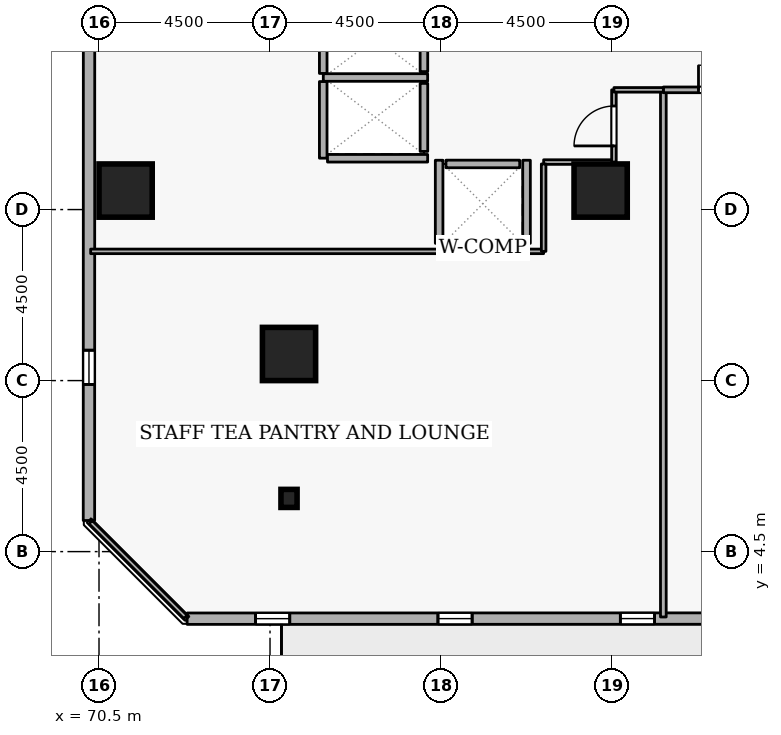
"""IFC4 building model, lengths in metres.
Left out: names, types, materials, properties, quantities, classifications, styles, units other than length and angle.
Written with IfcOpenShell. Run it as: python <this file> out.ifc"""

import sys

from ifc_helpers import new_model, si_unit, direction, frame, frame_2d, origin, origin_2d, place, context, subcontext, project, spatial, rectangle, i_section, extrude, element, fill, save


model = new_model("IFC4")
c1 = context("Model", 3, precision=1e-05, world=origin(), true_north=direction((0.0, 1.0)))
c2 = subcontext(c1, "Body", "Model", "MODEL_VIEW")
j1 = project(units=[si_unit("LENGTHUNIT", "METRE"), si_unit("PLANEANGLEUNIT", "RADIAN")], contexts=[c1])
p1 = place(None, origin())
s1 = spatial("IfcSite", under=j1, at=p1, CompositionType="ELEMENT")
p2 = place(p1, origin())
s2 = spatial("IfcBuilding", under=s1, at=p2, CompositionType="ELEMENT")
p3 = place(p2, frame((0.0, 0.0, 42.3)))
s3 = spatial("IfcBuildingStorey", under=s2, at=p3, CompositionType="ELEMENT", Elevation=42.3)
for number, where, z_axis, x_axis in (
    (1, (71.2, 14.0, 0.0), (0.0, 0.0, 1.0), (1.0, 0.0, 0.0)),
    (2, (75.5, 9.7, 0.0), (0.0, 0.0, 1.0), (1.0, 0.0, 0.0)),
    (3, (83.7, 14.0, 0.0), (0.0, 0.0, 1.0), (1.0, 0.0, 0.0)),
):
    element("IfcColumn", number, at=place(p3, frame(where, z_axis=z_axis, x_axis=x_axis)), inside=s3, PredefinedType="COLUMN", context=c2, shape_type="SweptSolid", body=[
        extrude(rectangle(XDim=1.4, YDim=1.4, at=origin_2d()), origin(), (0.0, 0.0, 1.0), 3.6),
    ])
p4 = place(p3, frame((75.5, 5.9, 0.0), z_axis=(0.0, 0.0, 1.0), x_axis=(1.0, 0.0, 0.0)))
e4 = element("IfcColumn", 4, at=p4, inside=s3, PredefinedType="COLUMN", context=c2, shape_type="SweptSolid", body=[
    extrude(i_section(OverallWidth=0.424, OverallDepth=0.475, WebThickness=0.048, FlangeThickness=0.077, FilletRadius=0.015, at=origin_2d()), origin(), (0.0, 0.0, 1.0), 3.6),
])
p5 = place(p3, frame((72.819, 2.735, 0.0), z_axis=(0.0, 0.0, 1.0), x_axis=(0.999999978205, 0.000208784245, 0.0)))
e5 = element("IfcWall", 5, at=p5, inside=s3, PredefinedType="STANDARD", context=c2, shape_type="SweptSolid", body=[
    extrude(rectangle(XDim=35.08, YDim=0.3, at=frame_2d((17.54, 0.0))), origin(), (0.0, 0.0, 1.0), 2.7),
])
p6 = place(p5, frame((19.34, 0.0, 0.0)))
e6 = element("IfcOpeningElement", 6, at=p6, cuts=e5, PredefinedType="OPENING", context=c2, shape_type="SweptSolid", body=[
    extrude(rectangle(XDim=1.0, YDim=2.08, at=frame_2d((0.5, 1.04))), frame((0.0, 0.16, 0.0), z_axis=(0.0, -1.0, 0.0), x_axis=(1.0, 0.0, 0.0)), (0.0, 0.0, 1.0), 0.32),
])
p7 = place(p5, frame((1.8, 0.0, 0.72)))
e7 = element("IfcOpeningElement", 7, at=p7, cuts=e5, PredefinedType="OPENING", context=c2, shape_type="SweptSolid", body=[
    extrude(rectangle(XDim=0.9, YDim=1.75, at=frame_2d((0.45, 0.875))), frame((0.0, 0.16, 0.0), z_axis=(0.0, -1.0, 0.0), x_axis=(1.0, 0.0, 0.0)), (0.0, 0.0, 1.0), 0.32),
])
p8 = place(p5, frame((6.6, 0.0, 0.72)))
e8 = element("IfcOpeningElement", 8, at=p8, cuts=e5, PredefinedType="OPENING", context=c2, shape_type="SweptSolid", body=[
    extrude(rectangle(XDim=0.9, YDim=1.75, at=frame_2d((0.45, 0.875))), frame((0.0, 0.16, 0.0), z_axis=(0.0, -1.0, 0.0), x_axis=(1.0, 0.0, 0.0)), (0.0, 0.0, 1.0), 0.32),
])
p9 = place(p5, frame((11.4, 0.0, 0.72)))
e9 = element("IfcOpeningElement", 9, at=p9, cuts=e5, PredefinedType="OPENING", context=c2, shape_type="SweptSolid", body=[
    extrude(rectangle(XDim=0.9, YDim=1.75, at=frame_2d((0.45, 0.875))), frame((0.0, 0.16, 0.0), z_axis=(0.0, -1.0, 0.0), x_axis=(1.0, 0.0, 0.0)), (0.0, 0.0, 1.0), 0.32),
])
p10 = place(p5, frame((16.2, 0.0, 0.72)))
e10 = element("IfcOpeningElement", 10, at=p10, cuts=e5, PredefinedType="OPENING", context=c2, shape_type="SweptSolid", body=[
    extrude(rectangle(XDim=0.9, YDim=1.75, at=frame_2d((0.45, 0.875))), frame((0.0, 0.16, 0.0), z_axis=(0.0, -1.0, 0.0), x_axis=(1.0, 0.0, 0.0)), (0.0, 0.0, 1.0), 0.32),
])
p11 = place(p5, frame((25.8, 0.0, 0.72)))
e11 = element("IfcOpeningElement", 11, at=p11, cuts=e5, PredefinedType="OPENING", context=c2, shape_type="SweptSolid", body=[
    extrude(rectangle(XDim=0.9, YDim=1.75, at=frame_2d((0.45, 0.875))), frame((0.0, 0.16, 0.0), z_axis=(0.0, -1.0, 0.0), x_axis=(1.0, 0.0, 0.0)), (0.0, 0.0, 1.0), 0.32),
])
p12 = place(p3, frame((70.242, 40.399, 0.0), z_axis=(0.0, 0.0, 1.0), x_axis=(-0.000208784245, -0.999999978205, 0.0)))
e12 = element("IfcWall", 12, at=p12, inside=s3, PredefinedType="STANDARD", context=c2, shape_type="SweptSolid", body=[
    extrude(rectangle(XDim=35.08, YDim=0.3, at=frame_2d((17.54, 0.0))), origin(), (0.0, 0.0, 1.0), 2.7),
])
p13 = place(p12, frame((1.8, 0.0, 0.72)))
e13 = element("IfcOpeningElement", 13, at=p13, cuts=e12, PredefinedType="OPENING", context=c2, shape_type="SweptSolid", body=[
    extrude(rectangle(XDim=0.9, YDim=1.75, at=frame_2d((0.45, 0.875))), frame((0.0, 0.16, 0.0), z_axis=(0.0, -1.0, 0.0), x_axis=(1.0, 0.0, 0.0)), (0.0, 0.0, 1.0), 0.32),
])
p14 = place(p12, frame((6.6, 0.0, 0.72)))
e14 = element("IfcOpeningElement", 14, at=p14, cuts=e12, PredefinedType="OPENING", context=c2, shape_type="SweptSolid", body=[
    extrude(rectangle(XDim=0.9, YDim=1.75, at=frame_2d((0.45, 0.875))), frame((0.0, 0.16, 0.0), z_axis=(0.0, -1.0, 0.0), x_axis=(1.0, 0.0, 0.0)), (0.0, 0.0, 1.0), 0.32),
])
p15 = place(p12, frame((11.4, 0.0, 0.72)))
e15 = element("IfcOpeningElement", 15, at=p15, cuts=e12, PredefinedType="OPENING", context=c2, shape_type="SweptSolid", body=[
    extrude(rectangle(XDim=0.9, YDim=1.75, at=frame_2d((0.45, 0.875))), frame((0.0, 0.16, 0.0), z_axis=(0.0, -1.0, 0.0), x_axis=(1.0, 0.0, 0.0)), (0.0, 0.0, 1.0), 0.32),
])
p16 = place(p12, frame((16.2, 0.0, 0.72)))
e16 = element("IfcOpeningElement", 16, at=p16, cuts=e12, PredefinedType="OPENING", context=c2, shape_type="SweptSolid", body=[
    extrude(rectangle(XDim=0.9, YDim=1.75, at=frame_2d((0.45, 0.875))), frame((0.0, 0.16, 0.0), z_axis=(0.0, -1.0, 0.0), x_axis=(1.0, 0.0, 0.0)), (0.0, 0.0, 1.0), 0.32),
])
p17 = place(p12, frame((21.0, 0.0, 0.72)))
e17 = element("IfcOpeningElement", 17, at=p17, cuts=e12, PredefinedType="OPENING", context=c2, shape_type="SweptSolid", body=[
    extrude(rectangle(XDim=0.9, YDim=1.75, at=frame_2d((0.45, 0.875))), frame((0.0, 0.16, 0.0), z_axis=(0.0, -1.0, 0.0), x_axis=(1.0, 0.0, 0.0)), (0.0, 0.0, 1.0), 0.32),
])
p18 = place(p12, frame((30.6, 0.0, 0.72)))
e18 = element("IfcOpeningElement", 18, at=p18, cuts=e12, PredefinedType="OPENING", context=c2, shape_type="SweptSolid", body=[
    extrude(rectangle(XDim=0.9, YDim=1.75, at=frame_2d((0.45, 0.875))), frame((0.0, 0.16, 0.0), z_axis=(0.0, -1.0, 0.0), x_axis=(1.0, 0.0, 0.0)), (0.0, 0.0, 1.0), 0.32),
])
p19 = place(p3, frame((79.05, 17.13, 0.0), z_axis=(0.0, 0.0, 1.0), x_axis=(0.0, 1.0, 0.0)))
e19 = element("IfcWall", 19, at=p19, inside=s3, PredefinedType="STANDARD", context=c2, shape_type="SweptSolid", body=[
    extrude(rectangle(XDim=1.74, YDim=0.2, at=frame_2d((0.87, 0.0))), origin(), (0.0, 0.0, 1.0), 3.34),
])
p20 = place(p3, frame((79.05, 15.03, 0.0), z_axis=(0.0, 0.0, 1.0), x_axis=(0.0, 1.0, 0.0)))
e20 = element("IfcWall", 20, at=p20, inside=s3, PredefinedType="STANDARD", context=c2, shape_type="SweptSolid", body=[
    extrude(rectangle(XDim=1.79, YDim=0.2, at=frame_2d((0.895, 0.0))), origin(), (0.0, 0.0, 1.0), 3.34),
])
p21 = place(p3, frame((79.63, 14.7, 0.0), z_axis=(0.0, 0.0, 1.0), x_axis=(1.0, 0.0, 0.0)))
e21 = element("IfcWall", 21, at=p21, inside=s3, PredefinedType="STANDARD", context=c2, shape_type="SweptSolid", body=[
    extrude(rectangle(XDim=1.94, YDim=0.2, at=frame_2d((0.97, 0.0))), origin(), (0.0, 0.0, 1.0), 3.34),
])
p22 = place(p3, frame((76.402, 16.975, 0.0), z_axis=(0.0, 0.0, 1.0), x_axis=(1.0, 0.0, 0.0)))
e22 = element("IfcWall", 22, at=p22, inside=s3, PredefinedType="STANDARD", context=c2, shape_type="SweptSolid", body=[
    extrude(rectangle(XDim=2.746, YDim=0.2, at=frame_2d((1.373, 0.0))), origin(), (0.0, 0.0, 1.0), 3.34),
])
p23 = place(p3, frame((76.4, 14.852, 0.0), z_axis=(0.0, 0.0, 1.0), x_axis=(0.0, 1.0, 0.0)))
e23 = element("IfcWall", 23, at=p23, inside=s3, PredefinedType="STANDARD", context=c2, shape_type="SweptSolid", body=[
    extrude(rectangle(XDim=2.016, YDim=0.2, at=frame_2d((1.008, 0.0))), origin(), (0.0, 0.0, 1.0), 3.34),
])
p24 = place(p3, frame((76.4, 17.082, 0.0), z_axis=(0.0, 0.0, 1.0), x_axis=(0.0, 1.0, 0.0)))
e24 = element("IfcWall", 24, at=p24, inside=s3, PredefinedType="STANDARD", context=c2, shape_type="SweptSolid", body=[
    extrude(rectangle(XDim=1.856, YDim=0.2, at=frame_2d((0.928, 0.0))), origin(), (0.0, 0.0, 1.0), 3.34),
])
p25 = place(p3, frame((76.512, 14.85, 0.0), z_axis=(0.0, 0.0, 1.0), x_axis=(1.0, 0.0, 0.0)))
e25 = element("IfcWall", 25, at=p25, inside=s3, PredefinedType="STANDARD", context=c2, shape_type="SweptSolid", body=[
    extrude(rectangle(XDim=2.636, YDim=0.2, at=frame_2d((1.318, 0.0))), origin(), (0.0, 0.0, 1.0), 3.34),
])
p26 = place(p3, frame((79.452, 12.5, 0.0), z_axis=(0.0, 0.0, 1.0), x_axis=(1.0, 0.0, 0.0)))
e26 = element("IfcWall", 26, at=p26, inside=s3, PredefinedType="STANDARD", context=c2, shape_type="SweptSolid", body=[
    extrude(rectangle(XDim=2.296, YDim=0.2, at=frame_2d((1.148, 0.0))), origin(), (0.0, 0.0, 1.0), 3.34),
])
for number, where, z_axis, x_axis in (
    (27, (81.75, 12.612, 0.0), (0.0, 0.0, 1.0), (0.0, 1.0, 0.0)),
    (28, (79.45, 12.612, 0.0), (0.0, 0.0, 1.0), (0.0, 1.0, 0.0)),
):
    element("IfcWall", number, at=place(p3, frame(where, z_axis=z_axis, x_axis=x_axis)), inside=s3, PredefinedType="STANDARD", context=c2, shape_type="SweptSolid", body=[
        extrude(rectangle(XDim=2.186, YDim=0.2, at=frame_2d((1.093, 0.0))), origin(), (0.0, 0.0, 1.0), 3.34),
    ])
p27 = place(p3, frame((85.35, 2.78, 0.0), z_axis=(0.0, 0.0, 1.0), x_axis=(0.0, 1.0, 0.0)))
e29 = element("IfcWall", 29, at=p27, inside=s3, PredefinedType="PARTITIONING", context=c2, shape_type="SweptSolid", body=[
    extrude(rectangle(XDim=13.87, YDim=0.15, at=frame_2d((6.935, 0.0))), origin(), (0.0, 0.0, 1.0), 3.34),
])
p28 = place(p3, frame((85.35, 16.65, 0.0), z_axis=(0.0, 0.0, 1.0), x_axis=(1.0, 0.0, 0.0)))
e30 = element("IfcWall", 30, at=p28, inside=s3, PredefinedType="PARTITIONING", context=c2, shape_type="SweptSolid", body=[
    extrude(rectangle(XDim=3.15, YDim=0.15, at=frame_2d((1.575, 0.0))), origin(), (0.0, 0.0, 1.0), 3.34),
])
p29 = place(p28, frame((0.925, 0.0, 0.0)))
e31 = element("IfcOpeningElement", 31, at=p29, cuts=e30, PredefinedType="OPENING", context=c2, shape_type="SweptSolid", body=[
    extrude(rectangle(XDim=1.3, YDim=2.12, at=frame_2d((0.65, 1.06))), frame((0.0, 0.085, 0.0), z_axis=(0.0, -1.0, 0.0), x_axis=(1.0, 0.0, 0.0)), (0.0, 0.0, 1.0), 0.17),
])
p30 = place(p3, frame((82.2, 14.75, 0.0), z_axis=(0.0, 0.0, 1.0), x_axis=(1.0, 0.0, 0.0)))
e32 = element("IfcWall", 32, at=p30, inside=s3, PredefinedType="PARTITIONING", context=c2, shape_type="SweptSolid", body=[
    extrude(rectangle(XDim=1.85, YDim=0.12, at=frame_2d((0.925, 0.0))), origin(), (0.0, 0.0, 1.0), 3.34),
])
p31 = place(p3, frame((84.05, 14.75, 0.0), z_axis=(0.0, 0.0, 1.0), x_axis=(0.0, 1.0, 0.0)))
e33 = element("IfcWall", 33, at=p31, inside=s3, PredefinedType="PARTITIONING", context=c2, shape_type="SweptSolid", body=[
    extrude(rectangle(XDim=1.9, YDim=0.12, at=frame_2d((0.95, 0.0))), origin(), (0.0, 0.0, 1.0), 3.34),
])
p32 = place(p31, frame((0.425, 0.0, 0.0)))
e34 = element("IfcOpeningElement", 34, at=p32, cuts=e33, PredefinedType="OPENING", context=c2, shape_type="SweptSolid", body=[
    extrude(rectangle(XDim=1.05, YDim=2.1, at=frame_2d((0.525, 1.05))), frame((0.0, 0.07, 0.0), z_axis=(0.0, -1.0, 0.0), x_axis=(1.0, 0.0, 0.0)), (0.0, 0.0, 1.0), 0.14),
])
p33 = place(p3, frame((84.05, 16.65, 0.0), z_axis=(0.0, 0.0, 1.0), x_axis=(1.0, 0.0, 0.0)))
e35 = element("IfcWall", 35, at=p33, inside=s3, PredefinedType="PARTITIONING", context=c2, shape_type="SweptSolid", body=[
    extrude(rectangle(XDim=1.3, YDim=0.12, at=frame_2d((0.65, 0.0))), origin(), (0.0, 0.0, 1.0), 3.34),
])
p34 = place(p3, frame((72.775, 2.78, 0.0), z_axis=(0.0, 0.0, 1.0), x_axis=(-0.707106781187, 0.707106781187, 0.0)))
e36 = element("IfcWall", 36, at=p34, inside=s3, PredefinedType="PARTITIONING", context=c2, shape_type="SweptSolid", body=[
    extrude(rectangle(XDim=3.528, YDim=0.12, at=frame_2d((1.764, 0.0))), origin(), (0.0, 0.0, 1.0), 3.34),
])
p35 = place(p3, frame((70.28, 12.4, 0.0), z_axis=(0.0, 0.0, 1.0), x_axis=(1.0, 0.0, 0.0)))
e37 = element("IfcWall", 37, at=p35, inside=s3, PredefinedType="PARTITIONING", context=c2, shape_type="SweptSolid", body=[
    extrude(rectangle(XDim=9.172, YDim=0.12, at=frame_2d((4.586, 0.0))), origin(), (0.0, 0.0, 1.0), 3.34),
])
p36 = place(p3, frame((81.748, 12.4, 0.0), z_axis=(0.0, 0.0, 1.0), x_axis=(1.0, 0.0, 0.0)))
e38 = element("IfcWall", 38, at=p36, inside=s3, PredefinedType="PARTITIONING", context=c2, shape_type="SweptSolid", body=[
    extrude(rectangle(XDim=0.452, YDim=0.12, at=frame_2d((0.226, 0.0))), origin(), (0.0, 0.0, 1.0), 3.34),
])
p37 = place(p3, frame((82.2, 12.4, 0.0), z_axis=(0.0, 0.0, 1.0), x_axis=(0.0, 1.0, 0.0)))
e39 = element("IfcWall", 39, at=p37, inside=s3, PredefinedType="PARTITIONING", context=c2, shape_type="SweptSolid", body=[
    extrude(rectangle(XDim=2.3, YDim=0.12, at=frame_2d((1.15, 0.0))), origin(), (0.0, 0.0, 1.0), 3.34),
])
p38 = place(p7, origin())
e40 = element("IfcWindow", 40, at=p38, inside=s3, PartitioningType="SINGLE_PANEL", PredefinedType="WINDOW", context=c2, shape_type="SweptSolid", body=[
    extrude(rectangle(XDim=0.9, YDim=1.75, at=frame_2d((0.45, 0.875))), frame((0.0, 0.03, 0.0), z_axis=(0.0, -1.0, 0.0), x_axis=(1.0, 0.0, 0.0)), (0.0, 0.0, 1.0), 0.06),
])
fill(e7, e40)
p39 = place(p8, origin())
e41 = element("IfcWindow", 41, at=p39, inside=s3, PartitioningType="SINGLE_PANEL", PredefinedType="WINDOW", context=c2, shape_type="SweptSolid", body=[
    extrude(rectangle(XDim=0.9, YDim=1.75, at=frame_2d((0.45, 0.875))), frame((0.0, 0.03, 0.0), z_axis=(0.0, -1.0, 0.0), x_axis=(1.0, 0.0, 0.0)), (0.0, 0.0, 1.0), 0.06),
])
fill(e8, e41)
p40 = place(p9, origin())
e42 = element("IfcWindow", 42, at=p40, inside=s3, PartitioningType="SINGLE_PANEL", PredefinedType="WINDOW", context=c2, shape_type="SweptSolid", body=[
    extrude(rectangle(XDim=0.9, YDim=1.75, at=frame_2d((0.45, 0.875))), frame((0.0, 0.03, 0.0), z_axis=(0.0, -1.0, 0.0), x_axis=(1.0, 0.0, 0.0)), (0.0, 0.0, 1.0), 0.06),
])
fill(e9, e42)
p41 = place(p18, origin())
e43 = element("IfcWindow", 43, at=p41, inside=s3, PartitioningType="SINGLE_PANEL", PredefinedType="WINDOW", context=c2, shape_type="SweptSolid", body=[
    extrude(rectangle(XDim=0.9, YDim=1.75, at=frame_2d((0.45, 0.875))), frame((0.0, 0.03, 0.0), z_axis=(0.0, -1.0, 0.0), x_axis=(1.0, 0.0, 0.0)), (0.0, 0.0, 1.0), 0.06),
])
fill(e18, e43)
p42 = place(p29, origin())
e44 = element("IfcDoor", 44, at=p42, inside=s3, OperationType="DOUBLE_DOOR_SINGLE_SWING", PredefinedType="DOOR", context=c2, shape_type="SweptSolid", body=[
    extrude(rectangle(XDim=1.3, YDim=2.12, at=frame_2d((0.65, 1.06))), frame((0.0, 0.025, 0.0), z_axis=(0.0, -1.0, 0.0), x_axis=(1.0, 0.0, 0.0)), (0.0, 0.0, 1.0), 0.05),
])
fill(e31, e44)
p43 = place(p32, origin())
e45 = element("IfcDoor", 45, at=p43, inside=s3, OperationType="SINGLE_SWING_LEFT", PredefinedType="DOOR", context=c2, shape_type="SweptSolid", body=[
    extrude(rectangle(XDim=1.05, YDim=2.1, at=frame_2d((0.525, 1.05))), frame((0.0, 0.025, 0.0), z_axis=(0.0, -1.0, 0.0), x_axis=(1.0, 0.0, 0.0)), (0.0, 0.0, 1.0), 0.05),
])
fill(e34, e45)
save(model, sys.argv[1])
